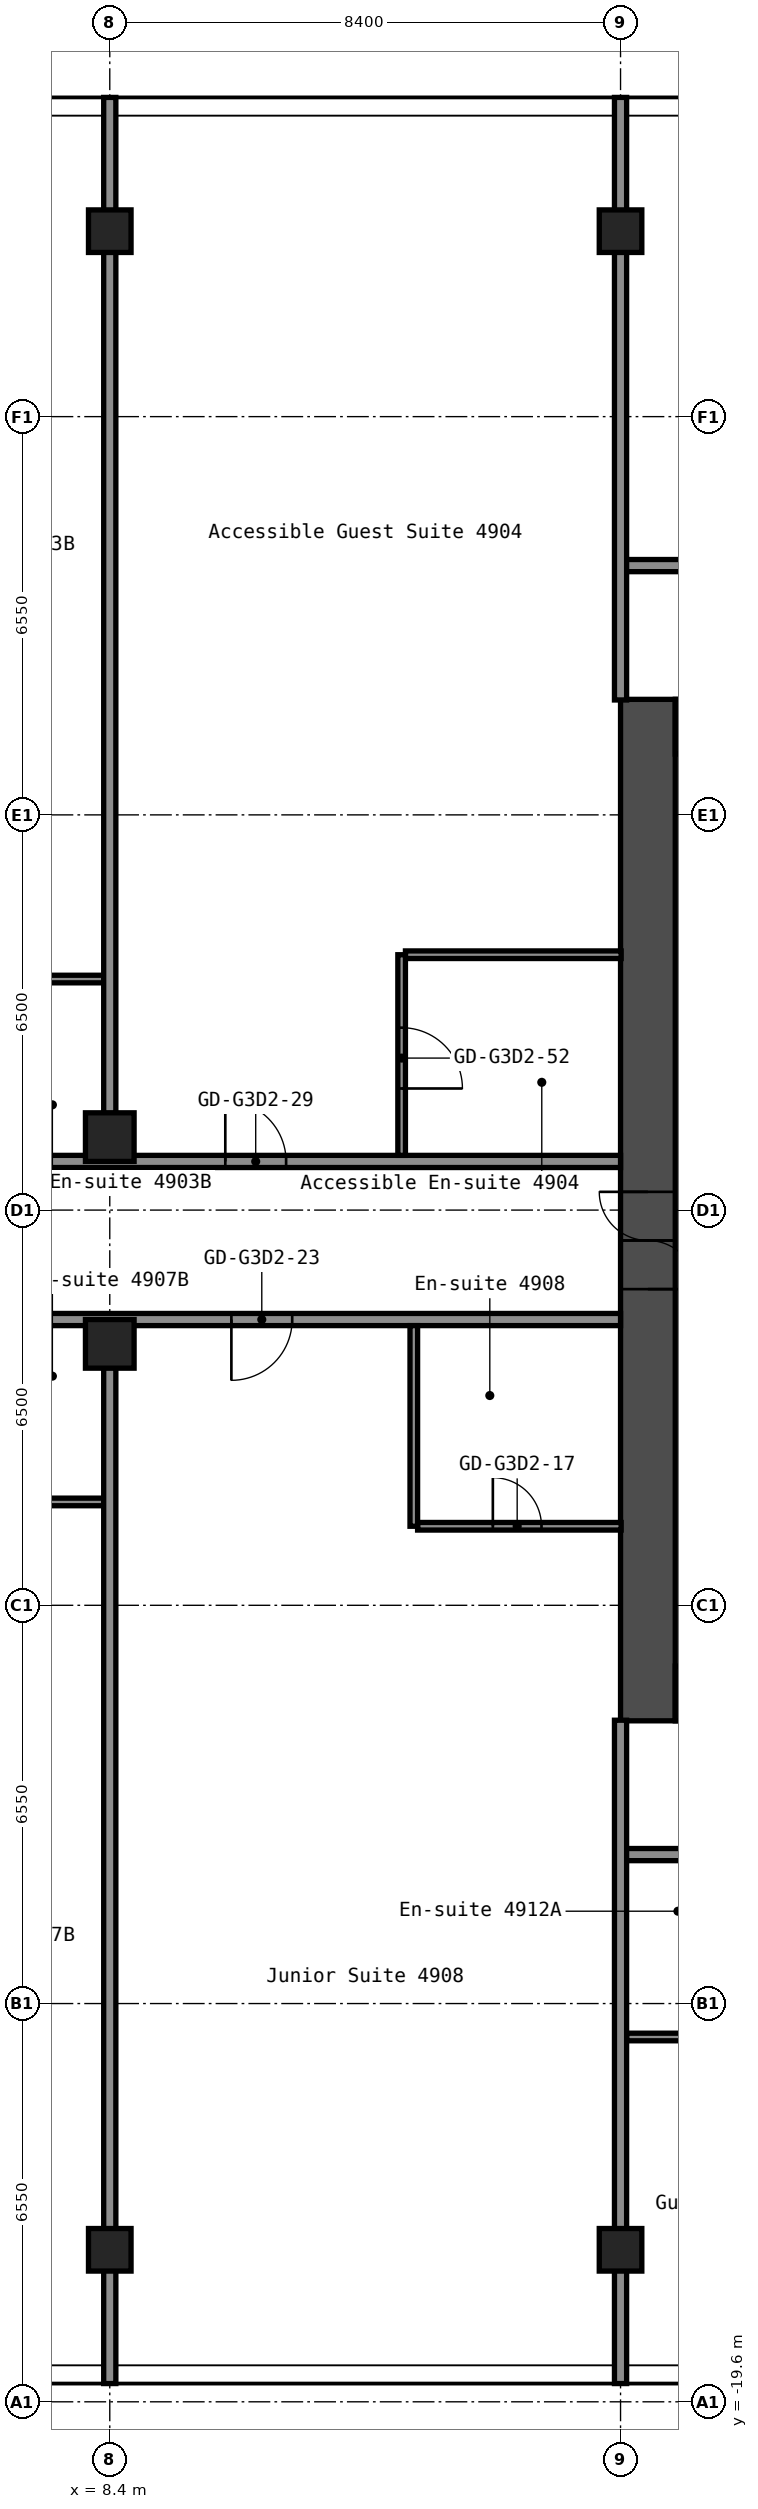
"""IFC4 building model, lengths in metres.
Left out: names, types, materials, properties, quantities, classifications, styles, units other than length and angle.
Written with IfcOpenShell. Run it as: python <this file> out.ifc"""

import sys

from ifc_helpers import new_model, si_unit, direction, frame, frame_2d, origin, origin_2d, place, context, subcontext, project, spatial, rectangle, hollow_rectangle, extrude, element, fill, save


model = new_model("IFC4")
c1 = context("Model", 3, precision=1e-05, world=origin(), true_north=direction((0.0, 1.0)))
c2 = subcontext(c1, "Body", "Model", "MODEL_VIEW")
j1 = project(units=[si_unit("LENGTHUNIT", "METRE"), si_unit("PLANEANGLEUNIT", "RADIAN")], contexts=[c1])
p1 = place(None, origin())
s1 = spatial("IfcSite", under=j1, at=p1, CompositionType="ELEMENT")
p2 = place(p1, origin())
s2 = spatial("IfcBuilding", under=s1, at=p2, CompositionType="ELEMENT")
p3 = place(p2, frame((0.0, 0.0, 172.6)))
s3 = spatial("IfcBuildingStorey", under=s2, at=p3, CompositionType="ELEMENT", Elevation=172.6)
p4 = place(p3, frame((8.4, -17.1, 0.0), z_axis=(0.0, 0.0, 1.0), x_axis=(1.0, 0.0, 0.0)))
e1 = element("IfcColumn", 1, at=p4, inside=s3, PredefinedType="COLUMN", context=c2, shape_type="SweptSolid", body=[
    extrude(hollow_rectangle(XDim=0.7, YDim=0.7, WallThickness=0.028, at=origin_2d()), origin(), (0.0, 0.0, 1.0), 2.9),
])
for number, where, z_axis, x_axis in (
    (2, (8.4, -2.2, 0.0), (0.0, 0.0, 1.0), (1.0, 0.0, 0.0)),
    (3, (8.4, 1.2, 0.0), (0.0, 0.0, 1.0), (1.0, 0.0, 0.0)),
):
    element("IfcColumn", number, at=place(p3, frame(where, z_axis=z_axis, x_axis=x_axis)), inside=s3, PredefinedType="COLUMN", context=c2, shape_type="SweptSolid", body=[
        extrude(hollow_rectangle(XDim=0.8, YDim=0.8, WallThickness=0.032, at=origin_2d()), origin(), (0.0, 0.0, 1.0), 2.9),
    ])
for number, where, z_axis, x_axis in (
    (4, (8.4, 16.1, 0.0), (0.0, 0.0, 1.0), (1.0, 0.0, 0.0)),
    (5, (16.8, -17.1, 0.0), (0.0, 0.0, 1.0), (1.0, 0.0, 0.0)),
    (6, (16.8, 16.1, 0.0), (0.0, 0.0, 1.0), (1.0, 0.0, 0.0)),
):
    element("IfcColumn", number, at=place(p3, frame(where, z_axis=z_axis, x_axis=x_axis)), inside=s3, PredefinedType="COLUMN", context=c2, shape_type="SweptSolid", body=[
        extrude(hollow_rectangle(XDim=0.7, YDim=0.7, WallThickness=0.028, at=origin_2d()), origin(), (0.0, 0.0, 1.0), 2.9),
    ])
p5 = place(p3, frame((17.25, -8.4, 0.0), z_axis=(0.0, 0.0, 1.0), x_axis=(0.0, 1.0, 0.0)))
e7 = element("IfcWall", 7, at=p5, inside=s3, PredefinedType="SHEAR", context=c2, shape_type="SweptSolid", body=[
    extrude(rectangle(XDim=16.8, YDim=0.9, at=frame_2d((8.4, 0.0))), origin(), (0.0, 0.0, 1.0), 2.9),
])
p6 = place(p5, frame((7.1, 0.0, 0.0)))
e8 = element("IfcOpeningElement", 8, at=p6, cuts=e7, PredefinedType="OPENING", context=c2, shape_type="SweptSolid", body=[
    extrude(rectangle(XDim=1.6, YDim=2.1, at=frame_2d((0.8, 1.05))), frame((0.0, 0.46, 0.0), z_axis=(0.0, -1.0, 0.0), x_axis=(1.0, 0.0, 0.0)), (0.0, 0.0, 1.0), 0.92),
])
p7 = place(p3, frame((17.7, 7.95, 0.0), z_axis=(0.0, 0.0, 1.0), x_axis=(1.0, 0.0, 0.0)))
e9 = element("IfcWall", 9, at=p7, inside=s3, PredefinedType="SHEAR", context=c2, shape_type="SweptSolid", body=[
    extrude(rectangle(XDim=15.0, YDim=0.9, at=frame_2d((7.5, 0.0))), origin(), (0.0, 0.0, 1.0), 2.9),
])
p8 = place(p7, frame((10.4, 0.0, 0.0)))
e10 = element("IfcOpeningElement", 10, at=p8, cuts=e9, PredefinedType="OPENING", context=c2, shape_type="SweptSolid", body=[
    extrude(rectangle(XDim=1.2, YDim=2.1, at=frame_2d((0.6, 1.05))), frame((0.0, 0.46, 0.0), z_axis=(0.0, -1.0, 0.0), x_axis=(1.0, 0.0, 0.0)), (0.0, 0.0, 1.0), 0.92),
])
p9 = place(p7, frame((13.35, 0.0, 0.0)))
e11 = element("IfcOpeningElement", 11, at=p9, cuts=e9, PredefinedType="OPENING", context=c2, shape_type="SweptSolid", body=[
    extrude(rectangle(XDim=0.9, YDim=2.1, at=frame_2d((0.45, 1.05))), frame((0.0, 0.46, 0.0), z_axis=(0.0, -1.0, 0.0), x_axis=(1.0, 0.0, 0.0)), (0.0, 0.0, 1.0), 0.92),
])
p10 = place(p3, frame((17.7, -7.95, 0.0), z_axis=(0.0, 0.0, 1.0), x_axis=(1.0, 0.0, 0.0)))
e12 = element("IfcWall", 12, at=p10, inside=s3, PredefinedType="SHEAR", context=c2, shape_type="SweptSolid", body=[
    extrude(rectangle(XDim=15.0, YDim=0.9, at=frame_2d((7.5, 0.0))), origin(), (0.0, 0.0, 1.0), 2.9),
])
p11 = place(p10, frame((2.55, 0.0, 0.0)))
e13 = element("IfcOpeningElement", 13, at=p11, cuts=e12, PredefinedType="OPENING", context=c2, shape_type="SweptSolid", body=[
    extrude(rectangle(XDim=1.0, YDim=2.1, at=frame_2d((0.5, 1.05))), frame((0.0, 0.46, 0.0), z_axis=(0.0, -1.0, 0.0), x_axis=(1.0, 0.0, 0.0)), (0.0, 0.0, 1.0), 0.92),
])
p12 = place(p3, frame((16.9, -13.6, 0.0), z_axis=(0.0, 0.0, 1.0), x_axis=(1.0, 0.0, 0.0)))
e14 = element("IfcWall", 14, at=p12, inside=s3, PredefinedType="PARTITIONING", context=c2, shape_type="SweptSolid", body=[
    extrude(rectangle(XDim=2.338, YDim=0.125, at=frame_2d((1.169, 0.0))), origin(), (0.0, 0.0, 1.0), 2.9),
])
p13 = place(p3, frame((16.8, -10.6, 0.0), z_axis=(0.0, 0.0, 1.0), x_axis=(1.0, 0.0, 0.0)))
e15 = element("IfcWall", 15, at=p13, inside=s3, PredefinedType="PARTITIONING", context=c2, shape_type="SweptSolid", body=[
    extrude(rectangle(XDim=25.9, YDim=0.2, at=frame_2d((12.95, 0.0))), origin(), (0.0, 0.0, 1.0), 2.9),
])
p14 = place(p13, frame((2.85, 0.0, 0.0)))
e16 = element("IfcOpeningElement", 16, at=p14, cuts=e15, PredefinedType="OPENING", context=c2, shape_type="SweptSolid", body=[
    extrude(rectangle(XDim=1.0, YDim=2.1, at=frame_2d((0.5, 1.05))), frame((0.0, 0.11, 0.0), z_axis=(0.0, -1.0, 0.0), x_axis=(1.0, 0.0, 0.0)), (0.0, 0.0, 1.0), 0.22),
])
p15 = place(p13, frame((4.55, 0.0, 0.0)))
e17 = element("IfcOpeningElement", 17, at=p15, cuts=e15, PredefinedType="OPENING", context=c2, shape_type="SweptSolid", body=[
    extrude(rectangle(XDim=1.0, YDim=2.1, at=frame_2d((0.5, 1.05))), frame((0.0, 0.11, 0.0), z_axis=(0.0, -1.0, 0.0), x_axis=(1.0, 0.0, 0.0)), (0.0, 0.0, 1.0), 0.22),
])
p16 = place(p13, frame((10.4, 0.0, 0.0)))
e18 = element("IfcOpeningElement", 18, at=p16, cuts=e15, PredefinedType="OPENING", context=c2, shape_type="SweptSolid", body=[
    extrude(rectangle(XDim=1.0, YDim=2.1, at=frame_2d((0.5, 1.05))), frame((0.0, 0.11, 0.0), z_axis=(0.0, -1.0, 0.0), x_axis=(1.0, 0.0, 0.0)), (0.0, 0.0, 1.0), 0.22),
])
p17 = place(p13, frame((19.75, 0.0, 0.0)))
e19 = element("IfcOpeningElement", 19, at=p17, cuts=e15, PredefinedType="OPENING", context=c2, shape_type="SweptSolid", body=[
    extrude(rectangle(XDim=1.0, YDim=2.1, at=frame_2d((0.5, 1.05))), frame((0.0, 0.11, 0.0), z_axis=(0.0, -1.0, 0.0), x_axis=(1.0, 0.0, 0.0)), (0.0, 0.0, 1.0), 0.22),
])
p18 = place(p13, frame((21.65, 0.0, 0.0)))
e20 = element("IfcOpeningElement", 20, at=p18, cuts=e15, PredefinedType="OPENING", context=c2, shape_type="SweptSolid", body=[
    extrude(rectangle(XDim=1.0, YDim=2.1, at=frame_2d((0.5, 1.05))), frame((0.0, 0.11, 0.0), z_axis=(0.0, -1.0, 0.0), x_axis=(1.0, 0.0, 0.0)), (0.0, 0.0, 1.0), 0.22),
])
p19 = place(p3, frame((13.462, -5.2, 0.0), z_axis=(0.0, 0.0, 1.0), x_axis=(1.0, 0.0, 0.0)))
e21 = element("IfcWall", 21, at=p19, inside=s3, PredefinedType="PARTITIONING", context=c2, shape_type="SweptSolid", body=[
    extrude(rectangle(XDim=3.348, YDim=0.125, at=frame_2d((1.674, 0.0))), origin(), (0.0, 0.0, 1.0), 2.9),
])
p20 = place(p19, frame((1.238, 0.0, 0.0)))
e22 = element("IfcOpeningElement", 22, at=p20, cuts=e21, PredefinedType="OPENING", context=c2, shape_type="SweptSolid", body=[
    extrude(rectangle(XDim=0.8, YDim=2.1, at=frame_2d((0.4, 1.05))), frame((0.0, 0.073, 0.0), z_axis=(0.0, -1.0, 0.0), x_axis=(1.0, 0.0, 0.0)), (0.0, 0.0, 1.0), 0.145),
])
p21 = place(p3, frame((5.962, -4.8, 0.0), z_axis=(0.0, 0.0, 1.0), x_axis=(1.0, 0.0, 0.0)))
e23 = element("IfcWall", 23, at=p21, inside=s3, PredefinedType="PARTITIONING", context=c2, shape_type="SweptSolid", body=[
    extrude(rectangle(XDim=2.338, YDim=0.125, at=frame_2d((1.169, 0.0))), origin(), (0.0, 0.0, 1.0), 2.9),
])
p22 = place(p3, frame((-16.8, -1.8, 0.0), z_axis=(0.0, 0.0, 1.0), x_axis=(1.0, 0.0, 0.0)))
e24 = element("IfcWall", 24, at=p22, inside=s3, PredefinedType="PARTITIONING", context=c2, shape_type="SweptSolid", body=[
    extrude(rectangle(XDim=33.6, YDim=0.2, at=frame_2d((16.8, 0.0))), origin(), (0.0, 0.0, 1.0), 2.9),
])
p23 = place(p22, frame((2.85, 0.0, 0.0)))
e25 = element("IfcOpeningElement", 25, at=p23, cuts=e24, PredefinedType="OPENING", context=c2, shape_type="SweptSolid", body=[
    extrude(rectangle(XDim=1.0, YDim=2.1, at=frame_2d((0.5, 1.05))), frame((0.0, 0.11, 0.0), z_axis=(0.0, -1.0, 0.0), x_axis=(1.0, 0.0, 0.0)), (0.0, 0.0, 1.0), 0.22),
])
p24 = place(p22, frame((4.55, 0.0, 0.0)))
e26 = element("IfcOpeningElement", 26, at=p24, cuts=e24, PredefinedType="OPENING", context=c2, shape_type="SweptSolid", body=[
    extrude(rectangle(XDim=1.0, YDim=2.1, at=frame_2d((0.5, 1.05))), frame((0.0, 0.11, 0.0), z_axis=(0.0, -1.0, 0.0), x_axis=(1.0, 0.0, 0.0)), (0.0, 0.0, 1.0), 0.22),
])
p25 = place(p22, frame((12.1, 0.0, 0.0)))
e27 = element("IfcOpeningElement", 27, at=p25, cuts=e24, PredefinedType="OPENING", context=c2, shape_type="SweptSolid", body=[
    extrude(rectangle(XDim=1.0, YDim=2.1, at=frame_2d((0.5, 1.05))), frame((0.0, 0.11, 0.0), z_axis=(0.0, -1.0, 0.0), x_axis=(1.0, 0.0, 0.0)), (0.0, 0.0, 1.0), 0.22),
])
p26 = place(p22, frame((19.65, 0.0, 0.0)))
e28 = element("IfcOpeningElement", 28, at=p26, cuts=e24, PredefinedType="OPENING", context=c2, shape_type="SweptSolid", body=[
    extrude(rectangle(XDim=1.0, YDim=2.1, at=frame_2d((0.5, 1.05))), frame((0.0, 0.11, 0.0), z_axis=(0.0, -1.0, 0.0), x_axis=(1.0, 0.0, 0.0)), (0.0, 0.0, 1.0), 0.22),
])
p27 = place(p22, frame((21.35, 0.0, 0.0)))
e29 = element("IfcOpeningElement", 29, at=p27, cuts=e24, PredefinedType="OPENING", context=c2, shape_type="SweptSolid", body=[
    extrude(rectangle(XDim=1.0, YDim=2.1, at=frame_2d((0.5, 1.05))), frame((0.0, 0.11, 0.0), z_axis=(0.0, -1.0, 0.0), x_axis=(1.0, 0.0, 0.0)), (0.0, 0.0, 1.0), 0.22),
])
p28 = place(p22, frame((27.2, 0.0, 0.0)))
e30 = element("IfcOpeningElement", 30, at=p28, cuts=e24, PredefinedType="OPENING", context=c2, shape_type="SweptSolid", body=[
    extrude(rectangle(XDim=1.0, YDim=2.1, at=frame_2d((0.5, 1.05))), frame((0.0, 0.11, 0.0), z_axis=(0.0, -1.0, 0.0), x_axis=(1.0, 0.0, 0.0)), (0.0, 0.0, 1.0), 0.22),
])
p29 = place(p3, frame((-16.8, 0.8, 0.0), z_axis=(0.0, 0.0, 1.0), x_axis=(1.0, 0.0, 0.0)))
e31 = element("IfcWall", 31, at=p29, inside=s3, PredefinedType="PARTITIONING", context=c2, shape_type="SweptSolid", body=[
    extrude(rectangle(XDim=33.6, YDim=0.2, at=frame_2d((16.8, 0.0))), origin(), (0.0, 0.0, 1.0), 2.9),
])
p30 = place(p29, frame((2.85, 0.0, 0.0)))
e32 = element("IfcOpeningElement", 32, at=p30, cuts=e31, PredefinedType="OPENING", context=c2, shape_type="SweptSolid", body=[
    extrude(rectangle(XDim=1.0, YDim=2.1, at=frame_2d((0.5, 1.05))), frame((0.0, 0.11, 0.0), z_axis=(0.0, -1.0, 0.0), x_axis=(1.0, 0.0, 0.0)), (0.0, 0.0, 1.0), 0.22),
])
p31 = place(p29, frame((4.55, 0.0, 0.0)))
e33 = element("IfcOpeningElement", 33, at=p31, cuts=e31, PredefinedType="OPENING", context=c2, shape_type="SweptSolid", body=[
    extrude(rectangle(XDim=1.0, YDim=2.1, at=frame_2d((0.5, 1.05))), frame((0.0, 0.11, 0.0), z_axis=(0.0, -1.0, 0.0), x_axis=(1.0, 0.0, 0.0)), (0.0, 0.0, 1.0), 0.22),
])
p32 = place(p29, frame((13.8, 0.0, 0.0)))
e34 = element("IfcOpeningElement", 34, at=p32, cuts=e31, PredefinedType="OPENING", context=c2, shape_type="SweptSolid", body=[
    extrude(rectangle(XDim=1.0, YDim=2.1, at=frame_2d((0.5, 1.05))), frame((0.0, 0.11, 0.0), z_axis=(0.0, -1.0, 0.0), x_axis=(1.0, 0.0, 0.0)), (0.0, 0.0, 1.0), 0.22),
])
p33 = place(p29, frame((19.65, 0.0, 0.0)))
e35 = element("IfcOpeningElement", 35, at=p33, cuts=e31, PredefinedType="OPENING", context=c2, shape_type="SweptSolid", body=[
    extrude(rectangle(XDim=1.0, YDim=2.1, at=frame_2d((0.5, 1.05))), frame((0.0, 0.11, 0.0), z_axis=(0.0, -1.0, 0.0), x_axis=(1.0, 0.0, 0.0)), (0.0, 0.0, 1.0), 0.22),
])
p34 = place(p29, frame((21.35, 0.0, 0.0)))
e36 = element("IfcOpeningElement", 36, at=p34, cuts=e31, PredefinedType="OPENING", context=c2, shape_type="SweptSolid", body=[
    extrude(rectangle(XDim=1.0, YDim=2.1, at=frame_2d((0.5, 1.05))), frame((0.0, 0.11, 0.0), z_axis=(0.0, -1.0, 0.0), x_axis=(1.0, 0.0, 0.0)), (0.0, 0.0, 1.0), 0.22),
])
p35 = place(p29, frame((27.1, 0.0, 0.0)))
e37 = element("IfcOpeningElement", 37, at=p35, cuts=e31, PredefinedType="OPENING", context=c2, shape_type="SweptSolid", body=[
    extrude(rectangle(XDim=1.0, YDim=2.1, at=frame_2d((0.5, 1.05))), frame((0.0, 0.11, 0.0), z_axis=(0.0, -1.0, 0.0), x_axis=(1.0, 0.0, 0.0)), (0.0, 0.0, 1.0), 0.22),
])
p36 = place(p3, frame((5.962, 3.8, 0.0), z_axis=(0.0, 0.0, 1.0), x_axis=(1.0, 0.0, 0.0)))
e38 = element("IfcWall", 38, at=p36, inside=s3, PredefinedType="PARTITIONING", context=c2, shape_type="SweptSolid", body=[
    extrude(rectangle(XDim=2.338, YDim=0.125, at=frame_2d((1.169, 0.0))), origin(), (0.0, 0.0, 1.0), 2.9),
])
p37 = place(p3, frame((13.262, 4.2, 0.0), z_axis=(0.0, 0.0, 1.0), x_axis=(1.0, 0.0, 0.0)))
e39 = element("IfcWall", 39, at=p37, inside=s3, PredefinedType="PARTITIONING", context=c2, shape_type="SweptSolid", body=[
    extrude(rectangle(XDim=3.548, YDim=0.125, at=frame_2d((1.774, 0.0))), origin(), (0.0, 0.0, 1.0), 2.9),
])
p38 = place(p3, frame((16.8, 10.6, 0.0), z_axis=(0.0, 0.0, 1.0), x_axis=(1.0, 0.0, 0.0)))
e40 = element("IfcWall", 40, at=p38, inside=s3, PredefinedType="PARTITIONING", context=c2, shape_type="SweptSolid", body=[
    extrude(rectangle(XDim=25.9, YDim=0.2, at=frame_2d((12.95, 0.0))), origin(), (0.0, 0.0, 1.0), 2.9),
])
p39 = place(p38, frame((3.4, 0.0, 0.0)))
e41 = element("IfcOpeningElement", 41, at=p39, cuts=e40, PredefinedType="OPENING", context=c2, shape_type="SweptSolid", body=[
    extrude(rectangle(XDim=1.6, YDim=2.1, at=frame_2d((0.8, 1.05))), frame((0.0, 0.11, 0.0), z_axis=(0.0, -1.0, 0.0), x_axis=(1.0, 0.0, 0.0)), (0.0, 0.0, 1.0), 0.22),
])
p40 = place(p38, frame((11.8, 0.0, 0.0)))
e42 = element("IfcOpeningElement", 42, at=p40, cuts=e40, PredefinedType="OPENING", context=c2, shape_type="SweptSolid", body=[
    extrude(rectangle(XDim=1.6, YDim=2.1, at=frame_2d((0.8, 1.05))), frame((0.0, 0.11, 0.0), z_axis=(0.0, -1.0, 0.0), x_axis=(1.0, 0.0, 0.0)), (0.0, 0.0, 1.0), 0.22),
])
p41 = place(p38, frame((20.4, 0.0, 0.0)))
e43 = element("IfcOpeningElement", 43, at=p41, cuts=e40, PredefinedType="OPENING", context=c2, shape_type="SweptSolid", body=[
    extrude(rectangle(XDim=1.6, YDim=2.1, at=frame_2d((0.8, 1.05))), frame((0.0, 0.11, 0.0), z_axis=(0.0, -1.0, 0.0), x_axis=(1.0, 0.0, 0.0)), (0.0, 0.0, 1.0), 0.22),
])
for number, where, z_axis, x_axis in (
    (44, (8.4, -19.3, 0.0), (0.0, 0.0, 1.0), (0.0, 1.0, 0.0)),
    (45, (8.4, 1.59, 0.0), (0.0, 0.0, 1.0), (0.0, 1.0, 0.0)),
):
    element("IfcWall", number, at=place(p3, frame(where, z_axis=z_axis, x_axis=x_axis)), inside=s3, PredefinedType="PARTITIONING", context=c2, shape_type="SweptSolid", body=[
        extrude(rectangle(XDim=16.71, YDim=0.2, at=frame_2d((8.355, 0.0))), origin(), (0.0, 0.0, 1.0), 2.9),
    ])
p42 = place(p3, frame((13.2, 0.9, 0.0), z_axis=(0.0, 0.0, 1.0), x_axis=(0.0, 1.0, 0.0)))
e46 = element("IfcWall", 46, at=p42, inside=s3, PredefinedType="PARTITIONING", context=c2, shape_type="SweptSolid", body=[
    extrude(rectangle(XDim=3.3, YDim=0.125, at=frame_2d((1.65, 0.0))), origin(), (0.0, 0.0, 1.0), 2.9),
])
p43 = place(p42, frame((1.1, 0.0, 0.0)))
e47 = element("IfcOpeningElement", 47, at=p43, cuts=e46, PredefinedType="OPENING", context=c2, shape_type="SweptSolid", body=[
    extrude(rectangle(XDim=1.0, YDim=2.1, at=frame_2d((0.5, 1.05))), frame((0.0, 0.073, 0.0), z_axis=(0.0, -1.0, 0.0), x_axis=(1.0, 0.0, 0.0)), (0.0, 0.0, 1.0), 0.145),
])
p44 = place(p3, frame((13.4, -5.2, 0.0), z_axis=(0.0, 0.0, 1.0), x_axis=(0.0, 1.0, 0.0)))
e48 = element("IfcWall", 48, at=p44, inside=s3, PredefinedType="PARTITIONING", context=c2, shape_type="SweptSolid", body=[
    extrude(rectangle(XDim=3.3, YDim=0.125, at=frame_2d((1.65, 0.0))), origin(), (0.0, 0.0, 1.0), 2.9),
])
p45 = place(p3, frame((16.8, -19.3, 0.0), z_axis=(0.0, 0.0, 1.0), x_axis=(0.0, 1.0, 0.0)))
e49 = element("IfcWall", 49, at=p45, inside=s3, PredefinedType="PARTITIONING", context=c2, shape_type="SweptSolid", body=[
    extrude(rectangle(XDim=10.91, YDim=0.2, at=frame_2d((5.455, 0.0))), origin(), (0.0, 0.0, 1.0), 2.9),
])
p46 = place(p3, frame((16.8, 8.39, 0.0), z_axis=(0.0, 0.0, 1.0), x_axis=(0.0, 1.0, 0.0)))
e50 = element("IfcWall", 50, at=p46, inside=s3, PredefinedType="PARTITIONING", context=c2, shape_type="SweptSolid", body=[
    extrude(rectangle(XDim=9.91, YDim=0.2, at=frame_2d((4.955, 0.0))), origin(), (0.0, 0.0, 1.0), 2.9),
])
p47 = place(p6, origin())
e51 = element("IfcDoor", 51, at=p47, inside=s3, OperationType="DOUBLE_DOOR_SINGLE_SWING", PredefinedType="DOOR", context=c2, shape_type="SweptSolid", body=[
    extrude(rectangle(XDim=1.6, YDim=2.1, at=frame_2d((0.8, 1.05))), frame((0.0, 0.025, 0.0), z_axis=(0.0, -1.0, 0.0), x_axis=(1.0, 0.0, 0.0)), (0.0, 0.0, 1.0), 0.05),
])
fill(e8, e51)
p48 = place(p20, origin())
e52 = element("IfcDoor", 52, at=p48, inside=s3, OperationType="SINGLE_SWING_RIGHT", PredefinedType="DOOR", context=c2, shape_type="SweptSolid", body=[
    extrude(rectangle(XDim=0.8, YDim=2.1, at=frame_2d((0.4, 1.05))), frame((0.0, 0.025, 0.0), z_axis=(0.0, -1.0, 0.0), x_axis=(1.0, 0.0, 0.0)), (0.0, 0.0, 1.0), 0.05),
])
fill(e22, e52)
p49 = place(p28, origin())
e53 = element("IfcDoor", 53, at=p49, inside=s3, OperationType="SINGLE_SWING_LEFT", PredefinedType="DOOR", context=c2, shape_type="SweptSolid", body=[
    extrude(rectangle(XDim=1.0, YDim=2.1, at=frame_2d((0.5, 1.05))), frame((0.0, 0.025, 0.0), z_axis=(0.0, -1.0, 0.0), x_axis=(1.0, 0.0, 0.0)), (0.0, 0.0, 1.0), 0.05),
])
fill(e30, e53)
p50 = place(p35, origin())
e54 = element("IfcDoor", 54, at=p50, inside=s3, OperationType="SINGLE_SWING_RIGHT", PredefinedType="DOOR", context=c2, shape_type="SweptSolid", body=[
    extrude(rectangle(XDim=1.0, YDim=2.1, at=frame_2d((0.5, 1.05))), frame((0.0, 0.025, 0.0), z_axis=(0.0, -1.0, 0.0), x_axis=(1.0, 0.0, 0.0)), (0.0, 0.0, 1.0), 0.05),
])
fill(e37, e54)
p51 = place(p43, origin())
e55 = element("IfcDoor", 55, at=p51, inside=s3, OperationType="SINGLE_SWING_LEFT", PredefinedType="DOOR", context=c2, shape_type="SweptSolid", body=[
    extrude(rectangle(XDim=1.0, YDim=2.1, at=frame_2d((0.5, 1.05))), frame((0.0, 0.025, 0.0), z_axis=(0.0, -1.0, 0.0), x_axis=(1.0, 0.0, 0.0)), (0.0, 0.0, 1.0), 0.05),
])
fill(e47, e55)
save(model, sys.argv[1])
